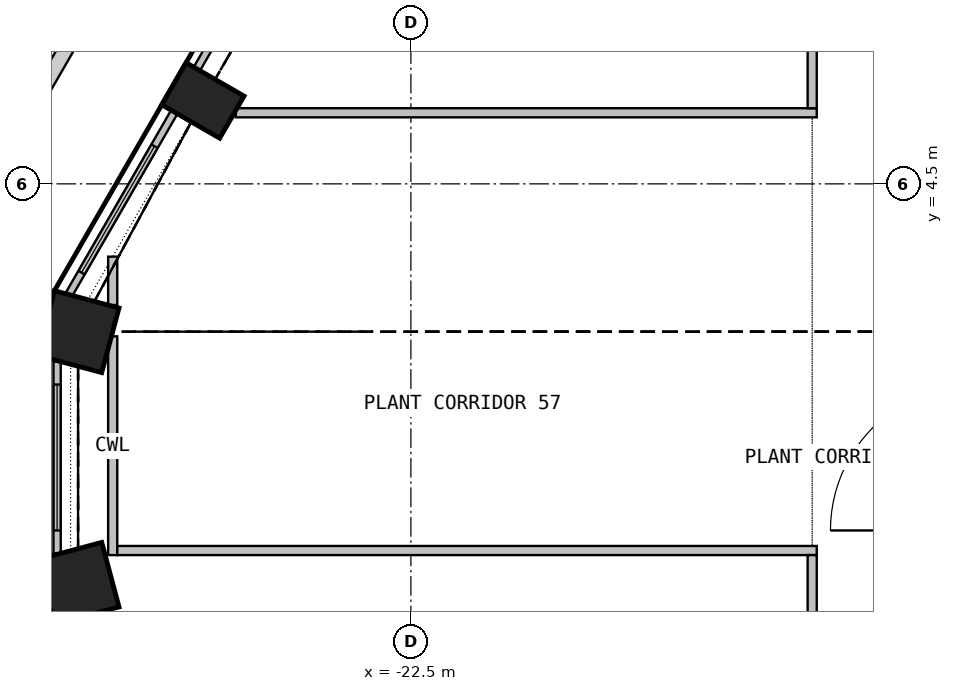
"""IFC4 building model, lengths in metres.
Left out: names, types, materials, properties, quantities, classifications, styles, units other than length and angle.
Written with IfcOpenShell. Run it as: python <this file> out.ifc"""

import sys

from ifc_helpers import new_model, si_unit, direction, frame, frame_2d, origin, origin_2d, place, context, subcontext, project, spatial, polyline, rectangle, outline, extrude, element, fill, save


model = new_model("IFC4")
c1 = context("Model", 3, precision=1e-05, world=origin(), true_north=direction((0.0, 1.0)))
c2 = subcontext(c1, "Body", "Model", "MODEL_VIEW")
j1 = project(units=[si_unit("LENGTHUNIT", "METRE"), si_unit("PLANEANGLEUNIT", "RADIAN")], contexts=[c1])
p1 = place(None, origin())
s1 = spatial("IfcSite", under=j1, at=p1, CompositionType="ELEMENT")
p2 = place(p1, origin())
s2 = spatial("IfcBuilding", under=s1, at=p2, CompositionType="ELEMENT")
p3 = place(p2, frame((0.0, 0.0, 230.7)))
s3 = spatial("IfcBuildingStorey", under=s2, at=p3, CompositionType="ELEMENT", Elevation=230.7)
p4 = place(p3, frame((-25.921, 5.872, 0.0), z_axis=(0.0, 0.0, 1.0), x_axis=(-0.5, -0.866025403784, 0.0)))
e1 = element("IfcColumn", 1, at=p4, inside=s3, PredefinedType="COLUMN", context=c2, shape_type="SweptSolid", body=[
    extrude(rectangle(XDim=0.8, YDim=1.1, at=origin_2d()), origin(), (0.0, 0.0, 1.0), 4.175),
])
for number, where, z_axis, x_axis in (
    (2, (-27.973, 2.07, 0.0), (0.0, 0.0, 1.0), (-0.259, -0.966, 0.0)),
    (3, (-27.973, -2.07, 0.0), (0.0, 0.0, 1.0), (0.259, -0.966, 0.0)),
):
    element("IfcColumn", number, at=place(p3, frame(where, z_axis=z_axis, x_axis=x_axis)), inside=s3, PredefinedType="COLUMN", context=c2, shape_type="SweptSolid", body=[
        extrude(rectangle(XDim=1.1, YDim=1.1, at=origin_2d()), origin(), (0.0, 0.0, 1.0), 4.175),
    ])
p5 = place(p3, frame((-24.17, 9.595, 0.0), z_axis=(0.0, 0.0, 1.0), x_axis=(-0.500029062817, -0.866008623709, 0.0)))
e4 = element("IfcWall", 4, at=p5, inside=s3, PredefinedType="SOLIDWALL", context=c2, shape_type="SweptSolid", body=[
    extrude(rectangle(XDim=3.699, YDim=0.12, at=frame_2d((1.85, 0.0))), origin(), (0.0, 0.0, 1.0), 4.175),
])
p6 = place(p5, frame((0.649, 0.0, 0.6)))
e5 = element("IfcOpeningElement", 5, at=p6, cuts=e4, PredefinedType="OPENING", context=c2, shape_type="SweptSolid", body=[
    extrude(rectangle(XDim=2.4, YDim=3.0, at=frame_2d((1.2, 1.5))), frame((0.0, 0.07, 0.0), z_axis=(0.0, -1.0, 0.0), x_axis=(1.0, 0.0, 0.0)), (0.0, 0.0, 1.0), 0.14),
])
p7 = place(p3, frame((-26.392, 5.681, 0.0), z_axis=(0.0, 0.0, 1.0), x_axis=(-0.500020560727, -0.866013532718, 0.0)))
e6 = element("IfcWall", 6, at=p7, inside=s3, PredefinedType="SOLIDWALL", context=c2, shape_type="SweptSolid", body=[
    extrude(rectangle(XDim=3.45, YDim=0.12, at=frame_2d((1.725, 0.0))), origin(), (0.0, 0.0, 1.0), 4.175),
])
p8 = place(p7, frame((0.649, 0.0, 0.6)))
e7 = element("IfcOpeningElement", 7, at=p8, cuts=e6, PredefinedType="OPENING", context=c2, shape_type="SweptSolid", body=[
    extrude(rectangle(XDim=2.4, YDim=3.0, at=frame_2d((1.2, 1.5))), frame((0.0, 0.07, 0.0), z_axis=(0.0, -1.0, 0.0), x_axis=(1.0, 0.0, 0.0)), (0.0, 0.0, 1.0), 0.14),
])
p9 = place(p3, frame((-28.319, 1.576, 0.0), z_axis=(0.0, 0.0, 1.0), x_axis=(0.0, -1.0, 0.0)))
e8 = element("IfcWall", 8, at=p9, inside=s3, PredefinedType="SOLIDWALL", context=c2, shape_type="SweptSolid", body=[
    extrude(rectangle(XDim=3.153, YDim=0.12, at=frame_2d((1.576, 0.0))), origin(), (0.0, 0.0, 1.0), 4.175),
])
p10 = place(p9, frame((0.376, 0.0, 0.6)))
e9 = element("IfcOpeningElement", 9, at=p10, cuts=e8, PredefinedType="OPENING", context=c2, shape_type="SweptSolid", body=[
    extrude(rectangle(XDim=2.4, YDim=3.0, at=frame_2d((1.2, 1.5))), frame((0.0, 0.07, 0.0), z_axis=(0.0, -1.0, 0.0), x_axis=(1.0, 0.0, 0.0)), (0.0, 0.0, 1.0), 0.14),
])
p11 = place(p3, origin())
e10 = element("IfcWall", 10, at=p11, inside=s3, PredefinedType="PARAPET", context=c2, shape_type="SweptSolid", body=[
    extrude(outline(polyline([(-26.397, 10.044), (-28.647, 6.147), (-28.431, 6.022), (-26.181, 9.919), (-26.397, 10.044)])), origin(), (0.0, 0.0, 1.0), 1.1),
])
p12 = place(p3, frame((-27.404, -1.605, 0.0), z_axis=(0.0, 0.0, 1.0), x_axis=(0.0, 1.0, 0.0)))
e11 = element("IfcWall", 11, at=p12, inside=s3, PredefinedType="PARTITIONING", context=c2, shape_type="SweptSolid", body=[
    extrude(rectangle(XDim=3.598, YDim=0.15, at=frame_2d((1.799, 0.0))), origin(), (0.0, 0.0, 1.0), 4.175),
])
p13 = place(p3, frame((-27.404, 2.507, 0.0), z_axis=(0.0, 0.0, 1.0), x_axis=(0.0, 1.0, 0.0)))
e12 = element("IfcWall", 12, at=p13, inside=s3, PredefinedType="PARTITIONING", context=c2, shape_type="SweptSolid", body=[
    extrude(rectangle(XDim=0.796, YDim=0.15, at=frame_2d((0.398, 0.0))), origin(), (0.0, 0.0, 1.0), 4.175),
])
p14 = place(p3, frame((-15.825, -1.53, 0.0), z_axis=(0.0, 0.0, 1.0), x_axis=(-1.0, 0.0, 0.0)))
e13 = element("IfcWall", 13, at=p14, inside=s3, PredefinedType="PARTITIONING", context=c2, shape_type="SweptSolid", body=[
    extrude(rectangle(XDim=11.504, YDim=0.15, at=frame_2d((5.752, 0.0))), origin(), (0.0, 0.0, 1.0), 4.175),
])
p15 = place(p3, frame((-25.38, 5.669, 0.0), z_axis=(0.0, 0.0, 1.0), x_axis=(1.0, 0.0, 0.0)))
e14 = element("IfcWall", 14, at=p15, inside=s3, PredefinedType="PARTITIONING", context=c2, shape_type="SweptSolid", body=[
    extrude(rectangle(XDim=9.555, YDim=0.15, at=frame_2d((4.777, 0.0))), origin(), (0.0, 0.0, 1.0), 4.175),
])
p16 = place(p3, frame((-15.9, -1.605, 0.0), z_axis=(0.0, 0.0, 1.0), x_axis=(0.0, -1.0, 0.0)))
e15 = element("IfcWall", 15, at=p16, inside=s3, PredefinedType="PARTITIONING", context=c2, shape_type="SweptSolid", body=[
    extrude(rectangle(XDim=12.12, YDim=0.15, at=frame_2d((6.06, 0.0))), origin(), (0.0, 0.0, 1.0), 4.175),
])
p17 = place(p3, frame((-15.9, 13.725, 0.0), z_axis=(0.0, 0.0, 1.0), x_axis=(0.0, -1.0, 0.0)))
e16 = element("IfcWall", 16, at=p17, inside=s3, PredefinedType="PARTITIONING", context=c2, shape_type="SweptSolid", body=[
    extrude(rectangle(XDim=7.981, YDim=0.15, at=frame_2d((3.991, 0.0))), origin(), (0.0, 0.0, 1.0), 4.175),
])
p18 = place(p8, origin())
e17 = element("IfcWindow", 17, at=p18, inside=s3, PartitioningType="SINGLE_PANEL", PredefinedType="WINDOW", context=c2, shape_type="SweptSolid", body=[
    extrude(rectangle(XDim=2.4, YDim=3.0, at=frame_2d((1.2, 1.5))), frame((0.0, 0.06, 0.0), z_axis=(0.0, -1.0, 0.0), x_axis=(1.0, 0.0, 0.0)), (0.0, 0.0, 1.0), 0.02),
])
fill(e7, e17)
p19 = place(p10, origin())
e18 = element("IfcWindow", 18, at=p19, inside=s3, PartitioningType="SINGLE_PANEL", PredefinedType="WINDOW", context=c2, shape_type="SweptSolid", body=[
    extrude(rectangle(XDim=2.4, YDim=3.0, at=frame_2d((1.2, 1.5))), frame((0.0, 0.06, 0.0), z_axis=(0.0, -1.0, 0.0), x_axis=(1.0, 0.0, 0.0)), (0.0, 0.0, 1.0), 0.02),
])
fill(e9, e18)
save(model, sys.argv[1])
